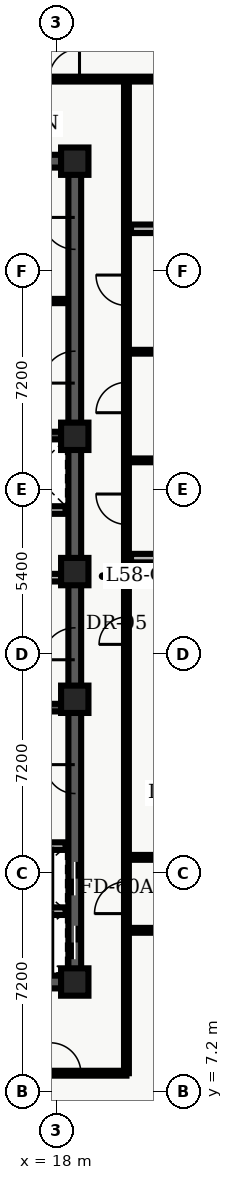
"""IFC4 building model, lengths in metres.
Left out: names, types, materials, properties, quantities, classifications, styles, units other than length and angle.
Written with IfcOpenShell. Run it as: python <this file> out.ifc"""

import sys

from ifc_helpers import new_model, entity, si_unit, converted_unit, direction, frame, origin_with_axes, origin_2d_with_axis, place, context, subcontext, project, spatial, polyline, rectangle, outline, extrude, element, fill, save


model = new_model("IFC4")
c1 = context("Model", 3, precision=1e-05, world=origin_with_axes(), true_north=direction((0.0, 1.0)))
c2 = subcontext(c1, "Body", "Model", "MODEL_VIEW")
j1 = project(units=[si_unit("LENGTHUNIT", "METRE"), converted_unit("PLANEANGLEUNIT", "DEGREE", entity("IfcPlaneAngleMeasure", 0.017), si_unit("PLANEANGLEUNIT", "RADIAN"), dimensions=[0, 0, 0, 0, 0, 0, 0])], contexts=[c1])
p1 = place(None, origin_with_axes())
s1 = spatial("IfcSite", under=j1, at=p1, CompositionType="ELEMENT")
p2 = place(p1, origin_with_axes())
s2 = spatial("IfcBuilding", under=s1, at=p2, CompositionType="ELEMENT")
p3 = place(p2, frame((0.0, 0.0, 236.4), z_axis=(0.0, 0.0, 1.0), x_axis=(1.0, 0.0, 0.0)))
s3 = spatial("IfcBuildingStorey", under=s2, at=p3, CompositionType="ELEMENT", Elevation=236.4)
p4 = place(p3, frame((11.4, 10.8, 0.0), z_axis=(0.0, 0.0, 1.0), x_axis=(1.0, 0.0, 0.0)))
e1 = element("IfcWall", 1, at=p4, inside=s3, PredefinedType="SHEAR", context=c2, shape_type="SweptSolid", body=[
    extrude(outline(polyline([(0.0, -0.21), (7.2, -0.21), (7.2, 0.21), (0.0, 0.21), (0.0, -0.21)])), origin_with_axes(), (0.0, 0.0, 1.0), 3.66),
])
p5 = place(p4, frame((2.625, 0.0, 0.0), z_axis=(0.0, 0.0, 1.0), x_axis=(1.0, 0.0, 0.0)))
e2 = element("IfcOpeningElement", 2, at=p5, cuts=e1, PredefinedType="OPENING", context=c2, shape_type="SweptSolid", body=[
    extrude(rectangle(XDim=1.05, YDim=0.44, at=origin_2d_with_axis()), origin_with_axes(), (0.0, 0.0, 1.0), 2.15),
])
p6 = place(p3, frame((11.4, 37.8, 0.0), z_axis=(0.0, 0.0, 1.0), x_axis=(1.0, 0.0, 0.0)))
e3 = element("IfcWall", 3, at=p6, inside=s3, PredefinedType="SHEAR", context=c2, shape_type="SweptSolid", body=[
    extrude(outline(polyline([(0.0, -0.21), (7.2, -0.21), (7.2, 0.21), (0.0, 0.21), (0.0, -0.21)])), origin_with_axes(), (0.0, 0.0, 1.0), 3.66),
])
p7 = place(p6, frame((2.625, 0.0, 0.0), z_axis=(0.0, 0.0, 1.0), x_axis=(1.0, 0.0, 0.0)))
e4 = element("IfcOpeningElement", 4, at=p7, cuts=e3, PredefinedType="OPENING", context=c2, shape_type="SweptSolid", body=[
    extrude(rectangle(XDim=1.05, YDim=0.44, at=origin_2d_with_axis()), origin_with_axes(), (0.0, 0.0, 1.0), 2.15),
])
p8 = place(p3, frame((18.6, 10.8, 0.0), z_axis=(0.0, 0.0, 1.0), x_axis=(0.0, 1.0, 0.0)))
e5 = element("IfcWall", 5, at=p8, inside=s3, PredefinedType="SHEAR", context=c2, shape_type="SweptSolid", body=[
    extrude(outline(polyline([(0.0, -0.21), (13.5, -0.21), (13.5, 0.21), (0.0, 0.21), (0.0, -0.21)])), origin_with_axes(), (0.0, 0.0, 1.0), 3.66),
])
p9 = place(p8, frame((1.3, 0.0, 0.0), z_axis=(0.0, 0.0, 1.0), x_axis=(1.0, 0.0, 0.0)))
e6 = element("IfcOpeningElement", 6, at=p9, cuts=e5, PredefinedType="OPENING", context=c2, shape_type="SweptSolid", body=[
    extrude(rectangle(XDim=1.1, YDim=0.44, at=origin_2d_with_axis()), origin_with_axes(), (0.0, 0.0, 1.0), 2.15),
])
p10 = place(p8, frame((3.4, 0.0, 0.0), z_axis=(0.0, 0.0, 1.0), x_axis=(1.0, 0.0, 0.0)))
e7 = element("IfcOpeningElement", 7, at=p10, cuts=e5, PredefinedType="OPENING", context=c2, shape_type="SweptSolid", body=[
    extrude(rectangle(XDim=1.1, YDim=0.44, at=origin_2d_with_axis()), origin_with_axes(), (0.0, 0.0, 1.0), 2.15),
])
p11 = place(p8, frame((11.125, 0.0, 0.0), z_axis=(0.0, 0.0, 1.0), x_axis=(1.0, 0.0, 0.0)))
e8 = element("IfcOpeningElement", 8, at=p11, cuts=e5, PredefinedType="OPENING", context=c2, shape_type="SweptSolid", body=[
    extrude(rectangle(XDim=1.05, YDim=0.44, at=origin_2d_with_axis()), origin_with_axes(), (0.0, 0.0, 1.0), 2.15),
])
p12 = place(p8, frame((6.675, 0.0, 0.0), z_axis=(0.0, 0.0, 1.0), x_axis=(1.0, 0.0, 0.0)))
e9 = element("IfcOpeningElement", 9, at=p12, cuts=e5, PredefinedType="OPENING", context=c2, shape_type="SweptSolid", body=[
    extrude(rectangle(XDim=0.95, YDim=0.44, at=origin_2d_with_axis()), origin_with_axes(), (0.0, 0.0, 1.0), 2.15),
])
p13 = place(p3, frame((18.6, 24.3, 0.0), z_axis=(0.0, 0.0, 1.0), x_axis=(0.0, 1.0, 0.0)))
e10 = element("IfcWall", 10, at=p13, inside=s3, PredefinedType="SHEAR", context=c2, shape_type="SweptSolid", body=[
    extrude(outline(polyline([(0.0, -0.21), (13.5, -0.21), (13.5, 0.21), (0.0, 0.21), (0.0, -0.21)])), origin_with_axes(), (0.0, 0.0, 1.0), 3.66),
])
p14 = place(p13, frame((6.725, 0.0, 0.0), z_axis=(0.0, 0.0, 1.0), x_axis=(1.0, 0.0, 0.0)))
e11 = element("IfcOpeningElement", 11, at=p14, cuts=e10, PredefinedType="OPENING", context=c2, shape_type="SweptSolid", body=[
    extrude(rectangle(XDim=1.05, YDim=0.44, at=origin_2d_with_axis()), origin_with_axes(), (0.0, 0.0, 1.0), 2.15),
])
p15 = place(p13, frame((11.125, 0.0, 0.0), z_axis=(0.0, 0.0, 1.0), x_axis=(1.0, 0.0, 0.0)))
e12 = element("IfcOpeningElement", 12, at=p15, cuts=e10, PredefinedType="OPENING", context=c2, shape_type="SweptSolid", body=[
    extrude(rectangle(XDim=1.05, YDim=0.44, at=origin_2d_with_axis()), origin_with_axes(), (0.0, 0.0, 1.0), 2.15),
])
for number, where, z_axis, x_axis in (
    (13, (11.61, 19.825, 0.0), (0.0, 0.0, 1.0), (1.0, 0.0, 0.0)),
    (14, (11.61, 28.775, 0.0), (0.0, 0.0, 1.0), (1.0, 0.0, 0.0)),
):
    element("IfcWall", number, at=place(p3, frame(where, z_axis=z_axis, x_axis=x_axis)), inside=s3, PredefinedType="SHEAR", context=c2, shape_type="SweptSolid", body=[
        extrude(outline(polyline([(0.0, -0.125), (6.78, -0.125), (6.78, 0.125), (0.0, 0.125), (0.0, -0.125)])), origin_with_axes(), (0.0, 0.0, 1.0), 3.66),
    ])
p16 = place(p3, frame((11.7, 24.1, 0.0), z_axis=(0.0, 0.0, 1.0), x_axis=(1.0, 0.0, 0.0)))
e15 = element("IfcWall", 15, at=p16, inside=s3, PredefinedType="SOLIDWALL", context=c2, shape_type="SweptSolid", body=[
    extrude(outline(polyline([(0.0, -0.125), (6.6, -0.125), (6.6, 0.125), (0.0, 0.125), (0.0, -0.125)])), origin_with_axes(), (0.0, 0.0, 1.0), 2.7),
])
p17 = place(p16, frame((3.6, 0.0, 0.0), z_axis=(0.0, 0.0, 1.0), x_axis=(1.0, 0.0, 0.0)))
e16 = element("IfcOpeningElement", 16, at=p17, cuts=e15, PredefinedType="OPENING", context=c2, shape_type="SweptSolid", body=[
    extrude(rectangle(XDim=0.9, YDim=0.27, at=origin_2d_with_axis()), origin_with_axes(), (0.0, 0.0, 1.0), 2.15),
])
p18 = place(p16, frame((5.65, 0.0, 0.0), z_axis=(0.0, 0.0, 1.0), x_axis=(1.0, 0.0, 0.0)))
e17 = element("IfcOpeningElement", 17, at=p18, cuts=e15, PredefinedType="OPENING", context=c2, shape_type="SweptSolid", body=[
    extrude(rectangle(XDim=0.9, YDim=0.27, at=origin_2d_with_axis()), origin_with_axes(), (0.0, 0.0, 1.0), 2.15),
])
p19 = place(p3, frame((11.7, 26.325, 0.0), z_axis=(0.0, 0.0, 1.0), x_axis=(1.0, 0.0, 0.0)))
e18 = element("IfcWall", 18, at=p19, inside=s3, PredefinedType="SOLIDWALL", context=c2, shape_type="SweptSolid", body=[
    extrude(outline(polyline([(0.0, -0.125), (6.6, -0.125), (6.6, 0.125), (0.0, 0.125), (0.0, -0.125)])), origin_with_axes(), (0.0, 0.0, 1.0), 2.7),
])
p20 = place(p19, frame((3.5, 0.0, 0.0), z_axis=(0.0, 0.0, 1.0), x_axis=(1.0, 0.0, 0.0)))
e19 = element("IfcOpeningElement", 19, at=p20, cuts=e18, PredefinedType="OPENING", context=c2, shape_type="SweptSolid", body=[
    extrude(rectangle(XDim=0.9, YDim=0.27, at=origin_2d_with_axis()), origin_with_axes(), (0.0, 0.0, 1.0), 2.15),
])
for number, where, z_axis, x_axis in (
    (20, (18.6, 10.8, 0.0), (0.0, 0.0, 1.0), (1.0, 0.0, 0.0)),
    (21, (18.6, 20.1, 0.0), (0.0, 0.0, 1.0), (1.0, 0.0, 0.0)),
    (22, (18.6, 24.3, 0.0), (0.0, 0.0, 1.0), (1.0, 0.0, 0.0)),
    (23, (18.6, 28.75, 0.0), (0.0, 0.0, 1.0), (1.0, 0.0, 0.0)),
    (24, (18.6, 37.8, 0.0), (0.0, 0.0, 1.0), (1.0, 0.0, 0.0)),
):
    element("IfcColumn", number, at=place(p3, frame(where, z_axis=z_axis, x_axis=x_axis)), inside=s3, PredefinedType="COLUMN", context=c2, shape_type="SweptSolid", body=[
        extrude(rectangle(XDim=0.9, YDim=0.9, at=origin_2d_with_axis()), origin_with_axes(), (0.0, 0.0, 1.0), 3.9),
    ])
for number, where, z_axis, x_axis in (
    (25, (15.84, 13.13, 0.0), (0.0, 0.0, 1.0), (1.0, 0.0, 0.0)),
    (26, (15.84, 15.27, 0.0), (0.0, 0.0, 1.0), (1.0, 0.0, 0.0)),
):
    element("IfcWall", number, at=place(p3, frame(where, z_axis=z_axis, x_axis=x_axis)), inside=s3, PredefinedType="SOLIDWALL", context=c2, shape_type="SweptSolid", body=[
        extrude(outline(polyline([(0.0, -0.125), (2.46, -0.125), (2.46, 0.125), (0.0, 0.125), (0.0, -0.125)])), origin_with_axes(), (0.0, 0.0, 1.0), 2.7),
    ])
p21 = place(p3, frame((15.84, 33.2, 0.0), z_axis=(0.0, 0.0, 1.0), x_axis=(1.0, 0.0, 0.0)))
e27 = element("IfcWall", 27, at=p21, inside=s3, PredefinedType="PARTITIONING", context=c2, shape_type="SweptSolid", body=[
    extrude(outline(polyline([(0.0, -0.07), (2.46, -0.07), (2.46, 0.07), (0.0, 0.07), (0.0, -0.07)])), origin_with_axes(), (0.0, 0.0, 1.0), 2.7),
])
p22 = place(p3, frame((7.1, 7.8, 0.0), z_axis=(0.0, 0.0, 1.0), x_axis=(1.0, 0.0, 0.0)))
e28 = element("IfcWall", 28, at=p22, inside=s3, PredefinedType="PARTITIONING", context=c2, shape_type="SweptSolid", body=[
    extrude(outline(polyline([(0.0, -0.08), (13.2, -0.08), (13.2, 0.08), (0.0, 0.08), (0.0, -0.08)])), origin_with_axes(), (0.0, 0.0, 1.0), 2.7),
])
p23 = place(p22, frame((2.929, 0.0, 0.0), z_axis=(0.0, 0.0, 1.0), x_axis=(1.0, 0.0, 0.0)))
e29 = element("IfcOpeningElement", 29, at=p23, cuts=e28, PredefinedType="OPENING", context=c2, shape_type="SweptSolid", body=[
    extrude(rectangle(XDim=1.0, YDim=0.18, at=origin_2d_with_axis()), origin_with_axes(), (0.0, 0.0, 1.0), 2.15),
])
p24 = place(p22, frame((7.56, 0.0, 0.0), z_axis=(0.0, 0.0, 1.0), x_axis=(1.0, 0.0, 0.0)))
e30 = element("IfcOpeningElement", 30, at=p24, cuts=e28, PredefinedType="OPENING", context=c2, shape_type="SweptSolid", body=[
    extrude(rectangle(XDim=1.0, YDim=0.18, at=origin_2d_with_axis()), origin_with_axes(), (0.0, 0.0, 1.0), 2.15),
])
p25 = place(p22, frame((11.201, 0.0, 0.0), z_axis=(0.0, 0.0, 1.0), x_axis=(1.0, 0.0, 0.0)))
e31 = element("IfcOpeningElement", 31, at=p25, cuts=e28, PredefinedType="OPENING", context=c2, shape_type="SweptSolid", body=[
    extrude(rectangle(XDim=1.0, YDim=0.18, at=origin_2d_with_axis()), origin_with_axes(), (0.0, 0.0, 1.0), 2.15),
])
p26 = place(p3, frame((7.1, 40.5, 0.0), z_axis=(0.0, 0.0, 1.0), x_axis=(1.0, 0.0, 0.0)))
e32 = element("IfcWall", 32, at=p26, inside=s3, PredefinedType="PARTITIONING", context=c2, shape_type="SweptSolid", body=[
    extrude(outline(polyline([(0.0, -0.08), (24.965, -0.08), (24.965, 0.08), (0.0, 0.08), (0.0, -0.08)])), origin_with_axes(), (0.0, 0.0, 1.0), 2.7),
])
p27 = place(p26, frame((1.441, 0.0, 0.0), z_axis=(0.0, 0.0, 1.0), x_axis=(1.0, 0.0, 0.0)))
e33 = element("IfcOpeningElement", 33, at=p27, cuts=e32, PredefinedType="OPENING", context=c2, shape_type="SweptSolid", body=[
    extrude(rectangle(XDim=1.0, YDim=0.18, at=origin_2d_with_axis()), origin_with_axes(), (0.0, 0.0, 1.0), 2.15),
])
p28 = place(p26, frame((4.415, 0.0, 0.0), z_axis=(0.0, 0.0, 1.0), x_axis=(1.0, 0.0, 0.0)))
e34 = element("IfcOpeningElement", 34, at=p28, cuts=e32, PredefinedType="OPENING", context=c2, shape_type="SweptSolid", body=[
    extrude(rectangle(XDim=1.0, YDim=0.18, at=origin_2d_with_axis()), origin_with_axes(), (0.0, 0.0, 1.0), 2.15),
])
p29 = place(p26, frame((7.614, 0.0, 0.0), z_axis=(0.0, 0.0, 1.0), x_axis=(1.0, 0.0, 0.0)))
e35 = element("IfcOpeningElement", 35, at=p29, cuts=e32, PredefinedType="OPENING", context=c2, shape_type="SweptSolid", body=[
    extrude(rectangle(XDim=1.0, YDim=0.18, at=origin_2d_with_axis()), origin_with_axes(), (0.0, 0.0, 1.0), 2.15),
])
p30 = place(p26, frame((11.156, 0.0, 0.0), z_axis=(0.0, 0.0, 1.0), x_axis=(1.0, 0.0, 0.0)))
e36 = element("IfcOpeningElement", 36, at=p30, cuts=e32, PredefinedType="OPENING", context=c2, shape_type="SweptSolid", body=[
    extrude(rectangle(XDim=1.0, YDim=0.18, at=origin_2d_with_axis()), origin_with_axes(), (0.0, 0.0, 1.0), 2.15),
])
p31 = place(p3, frame((20.3, 7.8, 0.0), z_axis=(0.0, 0.0, 1.0), x_axis=(0.0, 1.0, 0.0)))
e37 = element("IfcWall", 37, at=p31, inside=s3, PredefinedType="PARTITIONING", context=c2, shape_type="SweptSolid", body=[
    extrude(outline(polyline([(0.0, -0.08), (32.7, -0.08), (32.7, 0.08), (0.0, 0.08), (0.0, -0.08)])), origin_with_axes(), (0.0, 0.0, 1.0), 2.7),
])
p32 = place(p31, frame((14.556, 0.0, 0.0), z_axis=(0.0, 0.0, 1.0), x_axis=(1.0, 0.0, 0.0)))
e38 = element("IfcOpeningElement", 38, at=p32, cuts=e37, PredefinedType="OPENING", context=c2, shape_type="SweptSolid", body=[
    extrude(rectangle(XDim=0.9, YDim=0.18, at=origin_2d_with_axis()), origin_with_axes(), (0.0, 0.0, 1.0), 2.15),
])
p33 = place(p31, frame((18.551, 0.0, 0.0), z_axis=(0.0, 0.0, 1.0), x_axis=(1.0, 0.0, 0.0)))
e39 = element("IfcOpeningElement", 39, at=p33, cuts=e37, PredefinedType="OPENING", context=c2, shape_type="SweptSolid", body=[
    extrude(rectangle(XDim=1.0, YDim=0.18, at=origin_2d_with_axis()), origin_with_axes(), (0.0, 0.0, 1.0), 2.15),
])
p34 = place(p31, frame((22.226, 0.0, 0.0), z_axis=(0.0, 0.0, 1.0), x_axis=(1.0, 0.0, 0.0)))
e40 = element("IfcOpeningElement", 40, at=p34, cuts=e37, PredefinedType="OPENING", context=c2, shape_type="SweptSolid", body=[
    extrude(rectangle(XDim=1.0, YDim=0.18, at=origin_2d_with_axis()), origin_with_axes(), (0.0, 0.0, 1.0), 2.15),
])
p35 = place(p31, frame((25.754, 0.0, 0.0), z_axis=(0.0, 0.0, 1.0), x_axis=(1.0, 0.0, 0.0)))
e41 = element("IfcOpeningElement", 41, at=p35, cuts=e37, PredefinedType="OPENING", context=c2, shape_type="SweptSolid", body=[
    extrude(rectangle(XDim=1.0, YDim=0.18, at=origin_2d_with_axis()), origin_with_axes(), (0.0, 0.0, 1.0), 2.15),
])
p36 = place(p31, frame((5.775, 0.0, 0.0), z_axis=(0.0, 0.0, 1.0), x_axis=(1.0, 0.0, 0.0)))
e42 = element("IfcOpeningElement", 42, at=p36, cuts=e37, PredefinedType="OPENING", context=c2, shape_type="SweptSolid", body=[
    extrude(rectangle(XDim=1.05, YDim=0.18, at=origin_2d_with_axis()), origin_with_axes(), (0.0, 0.0, 1.0), 2.15),
])
p37 = place(p3, frame((20.45, 24.743, 0.0), z_axis=(0.0, 0.0, 1.0), x_axis=(1.0, 0.0, 0.0)))
e43 = element("IfcWall", 43, at=p37, inside=s3, PredefinedType="PARTITIONING", context=c2, shape_type="SweptSolid", body=[
    extrude(outline(polyline([(0.0, -0.14), (11.615, -0.14), (11.615, 0.14), (0.0, 0.14), (0.0, -0.14)])), origin_with_axes(), (0.0, 0.0, 1.0), 2.7),
])
for number, where, z_axis, x_axis in (
    (44, (20.45, 27.959, 0.0), (0.0, 0.0, 1.0), (1.0, 0.0, 0.0)),
    (45, (20.45, 31.532, 0.0), (0.0, 0.0, 1.0), (1.0, 0.0, 0.0)),
):
    element("IfcWall", number, at=place(p3, frame(where, z_axis=z_axis, x_axis=x_axis)), inside=s3, PredefinedType="PARTITIONING", context=c2, shape_type="SweptSolid", body=[
        extrude(outline(polyline([(0.0, -0.062), (11.615, -0.062), (11.615, 0.062), (0.0, 0.062), (0.0, -0.062)])), origin_with_axes(), (0.0, 0.0, 1.0), 2.7),
    ])
p38 = place(p3, frame((20.45, 35.576, 0.0), z_axis=(0.0, 0.0, 1.0), x_axis=(1.0, 0.0, 0.0)))
e46 = element("IfcWall", 46, at=p38, inside=s3, PredefinedType="PARTITIONING", context=c2, shape_type="SweptSolid", body=[
    extrude(outline(polyline([(0.0, -0.14), (11.615, -0.14), (11.615, 0.14), (0.0, 0.14), (0.0, -0.14)])), origin_with_axes(), (0.0, 0.0, 1.0), 2.7),
])
p39 = place(p38, frame((5.785, 0.0, 0.0), z_axis=(0.0, 0.0, 1.0), x_axis=(1.0, 0.0, 0.0)))
e47 = element("IfcOpeningElement", 47, at=p39, cuts=e46, PredefinedType="OPENING", context=c2, shape_type="SweptSolid", body=[
    extrude(rectangle(XDim=0.95, YDim=0.3, at=origin_2d_with_axis()), origin_with_axes(), (0.0, 0.0, 1.0), 2.15),
])
p40 = place(p3, frame((20.3, 12.5, 0.0), z_axis=(0.0, 0.0, 1.0), x_axis=(1.0, 0.0, 0.0)))
e48 = element("IfcWall", 48, at=p40, inside=s3, PredefinedType="PARTITIONING", context=c2, shape_type="SweptSolid", body=[
    extrude(outline(polyline([(0.0, -0.08), (16.05, -0.08), (16.05, 0.08), (0.0, 0.08), (0.0, -0.08)])), origin_with_axes(), (0.0, 0.0, 1.0), 2.7),
])
p41 = place(p40, frame((3.865, 0.0, 0.0), z_axis=(0.0, 0.0, 1.0), x_axis=(1.0, 0.0, 0.0)))
e49 = element("IfcOpeningElement", 49, at=p41, cuts=e48, PredefinedType="OPENING", context=c2, shape_type="SweptSolid", body=[
    extrude(rectangle(XDim=1.2, YDim=0.18, at=origin_2d_with_axis()), origin_with_axes(), (0.0, 0.0, 1.0), 2.2),
])
p42 = place(p40, frame((9.48, 0.0, 0.0), z_axis=(0.0, 0.0, 1.0), x_axis=(1.0, 0.0, 0.0)))
e50 = element("IfcOpeningElement", 50, at=p42, cuts=e48, PredefinedType="OPENING", context=c2, shape_type="SweptSolid", body=[
    extrude(rectangle(XDim=1.0, YDim=0.18, at=origin_2d_with_axis()), origin_with_axes(), (0.0, 0.0, 1.0), 2.15),
])
p43 = place(p40, frame((13.691, 0.0, 0.0), z_axis=(0.0, 0.0, 1.0), x_axis=(1.0, 0.0, 0.0)))
e51 = element("IfcOpeningElement", 51, at=p43, cuts=e48, PredefinedType="OPENING", context=c2, shape_type="SweptSolid", body=[
    extrude(rectangle(XDim=1.0, YDim=0.18, at=origin_2d_with_axis()), origin_with_axes(), (0.0, 0.0, 1.0), 2.15),
])
p44 = place(p3, frame((20.3, 14.9, 0.0), z_axis=(0.0, 0.0, 1.0), x_axis=(1.0, 0.0, 0.0)))
e52 = element("IfcWall", 52, at=p44, inside=s3, PredefinedType="PARTITIONING", context=c2, shape_type="SweptSolid", body=[
    extrude(outline(polyline([(0.0, -0.08), (16.05, -0.08), (16.05, 0.08), (0.0, 0.08), (0.0, -0.08)])), origin_with_axes(), (0.0, 0.0, 1.0), 2.7),
])
p45 = place(p44, frame((8.075, 0.0, 0.0), z_axis=(0.0, 0.0, 1.0), x_axis=(1.0, 0.0, 0.0)))
e53 = element("IfcOpeningElement", 53, at=p45, cuts=e52, PredefinedType="OPENING", context=c2, shape_type="SweptSolid", body=[
    extrude(rectangle(XDim=1.2, YDim=0.18, at=origin_2d_with_axis()), origin_with_axes(), (0.0, 0.0, 1.0), 2.2),
])
p46 = place(p8, frame((1.3, 0.0, 0.0), z_axis=(0.0, 0.0, 1.0), x_axis=(1.0, 0.0, 0.0)))
e54 = element("IfcDoor", 54, at=p46, inside=s3, OperationType="SLIDING_TO_LEFT", PredefinedType="DOOR", context=c2, shape_type="SweptSolid", body=[
    extrude(rectangle(XDim=1.1, YDim=0.09, at=origin_2d_with_axis()), origin_with_axes(), (0.0, 0.0, 1.0), 2.15),
])
fill(e6, e54)
p47 = place(p8, frame((3.4, 0.0, 0.0), z_axis=(0.0, 0.0, 1.0), x_axis=(1.0, 0.0, 0.0)))
e55 = element("IfcDoor", 55, at=p47, inside=s3, OperationType="SLIDING_TO_RIGHT", PredefinedType="DOOR", context=c2, shape_type="SweptSolid", body=[
    extrude(rectangle(XDim=1.1, YDim=0.09, at=origin_2d_with_axis()), origin_with_axes(), (0.0, 0.0, 1.0), 2.15),
])
fill(e7, e55)
p48 = place(p8, frame((11.125, 0.0, 0.0), z_axis=(0.0, 0.0, 1.0), x_axis=(1.0, 0.0, 0.0)))
e56 = element("IfcDoor", 56, at=p48, inside=s3, OperationType="SINGLE_SWING_LEFT", PredefinedType="DOOR", context=c2, shape_type="SweptSolid", body=[
    extrude(rectangle(XDim=1.05, YDim=0.09, at=origin_2d_with_axis()), origin_with_axes(), (0.0, 0.0, 1.0), 2.15),
])
fill(e8, e56)
p49 = place(p8, frame((6.675, 0.0, 0.0), z_axis=(0.0, 0.0, 1.0), x_axis=(1.0, 0.0, 0.0)))
e57 = element("IfcDoor", 57, at=p49, inside=s3, OperationType="SINGLE_SWING_RIGHT", PredefinedType="DOOR", context=c2, shape_type="SweptSolid", body=[
    extrude(rectangle(XDim=0.95, YDim=0.09, at=origin_2d_with_axis()), origin_with_axes(), (0.0, 0.0, 1.0), 2.15),
])
fill(e9, e57)
p50 = place(p13, frame((6.725, 0.0, 0.0), z_axis=(0.0, 0.0, 1.0), x_axis=(1.0, 0.0, 0.0)))
e58 = element("IfcDoor", 58, at=p50, inside=s3, OperationType="SINGLE_SWING_LEFT", PredefinedType="DOOR", context=c2, shape_type="SweptSolid", body=[
    extrude(rectangle(XDim=1.05, YDim=0.09, at=origin_2d_with_axis()), origin_with_axes(), (0.0, 0.0, 1.0), 2.15),
])
fill(e11, e58)
p51 = place(p13, frame((11.125, 0.0, 0.0), z_axis=(0.0, 0.0, 1.0), x_axis=(1.0, 0.0, 0.0)))
e59 = element("IfcDoor", 59, at=p51, inside=s3, OperationType="SINGLE_SWING_RIGHT", PredefinedType="DOOR", context=c2, shape_type="SweptSolid", body=[
    extrude(rectangle(XDim=1.05, YDim=0.09, at=origin_2d_with_axis()), origin_with_axes(), (0.0, 0.0, 1.0), 2.15),
])
fill(e12, e59)
p52 = place(p22, frame((11.201, 0.0, 0.0), z_axis=(0.0, 0.0, 1.0), x_axis=(1.0, 0.0, 0.0)))
e60 = element("IfcDoor", 60, at=p52, inside=s3, OperationType="SINGLE_SWING_LEFT", PredefinedType="DOOR", context=c2, shape_type="SweptSolid", body=[
    extrude(rectangle(XDim=1.0, YDim=0.09, at=origin_2d_with_axis()), origin_with_axes(), (0.0, 0.0, 1.0), 2.15),
])
fill(e31, e60)
p53 = place(p26, frame((11.156, 0.0, 0.0), z_axis=(0.0, 0.0, 1.0), x_axis=(1.0, 0.0, 0.0)))
e61 = element("IfcDoor", 61, at=p53, inside=s3, OperationType="SINGLE_SWING_RIGHT", PredefinedType="DOOR", context=c2, shape_type="SweptSolid", body=[
    extrude(rectangle(XDim=1.0, YDim=0.09, at=origin_2d_with_axis()), origin_with_axes(), (0.0, 0.0, 1.0), 2.15),
])
fill(e36, e61)
p54 = place(p31, frame((14.556, 0.0, 0.0), z_axis=(0.0, 0.0, 1.0), x_axis=(1.0, 0.0, 0.0)))
e62 = element("IfcDoor", 62, at=p54, inside=s3, OperationType="SINGLE_SWING_LEFT", PredefinedType="DOOR", context=c2, shape_type="SweptSolid", body=[
    extrude(rectangle(XDim=0.9, YDim=0.09, at=origin_2d_with_axis()), origin_with_axes(), (0.0, 0.0, 1.0), 2.15),
])
fill(e38, e62)
p55 = place(p31, frame((18.551, 0.0, 0.0), z_axis=(0.0, 0.0, 1.0), x_axis=(1.0, 0.0, 0.0)))
e63 = element("IfcDoor", 63, at=p55, inside=s3, OperationType="SINGLE_SWING_RIGHT", PredefinedType="DOOR", context=c2, shape_type="SweptSolid", body=[
    extrude(rectangle(XDim=1.0, YDim=0.09, at=origin_2d_with_axis()), origin_with_axes(), (0.0, 0.0, 1.0), 2.15),
])
fill(e39, e63)
p56 = place(p31, frame((22.226, 0.0, 0.0), z_axis=(0.0, 0.0, 1.0), x_axis=(1.0, 0.0, 0.0)))
e64 = element("IfcDoor", 64, at=p56, inside=s3, OperationType="SINGLE_SWING_LEFT", PredefinedType="DOOR", context=c2, shape_type="SweptSolid", body=[
    extrude(rectangle(XDim=1.0, YDim=0.09, at=origin_2d_with_axis()), origin_with_axes(), (0.0, 0.0, 1.0), 2.15),
])
fill(e40, e64)
p57 = place(p31, frame((25.754, 0.0, 0.0), z_axis=(0.0, 0.0, 1.0), x_axis=(1.0, 0.0, 0.0)))
e65 = element("IfcDoor", 65, at=p57, inside=s3, OperationType="SINGLE_SWING_RIGHT", PredefinedType="DOOR", context=c2, shape_type="SweptSolid", body=[
    extrude(rectangle(XDim=1.0, YDim=0.09, at=origin_2d_with_axis()), origin_with_axes(), (0.0, 0.0, 1.0), 2.15),
])
fill(e41, e65)
p58 = place(p31, frame((5.775, 0.0, 0.0), z_axis=(0.0, 0.0, 1.0), x_axis=(1.0, 0.0, 0.0)))
e66 = element("IfcDoor", 66, at=p58, inside=s3, OperationType="SINGLE_SWING_LEFT", PredefinedType="DOOR", context=c2, shape_type="SweptSolid", body=[
    extrude(rectangle(XDim=1.05, YDim=0.09, at=origin_2d_with_axis()), origin_with_axes(), (0.0, 0.0, 1.0), 2.15),
])
fill(e42, e66)
save(model, sys.argv[1])
